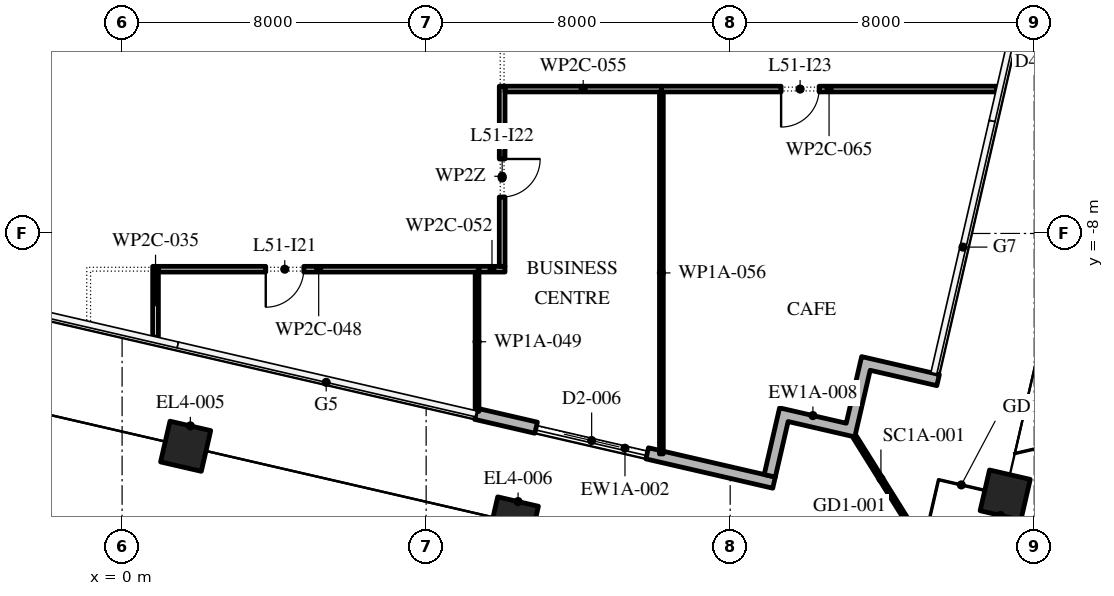
"""IFC4 building model, lengths in metres.
Left out: names, types, materials, properties, quantities, classifications, styles, units other than length and angle.
Written with IfcOpenShell. Run it as: python <this file> out.ifc"""

import sys

from ifc_helpers import new_model, si_unit, direction, frame, frame_2d, origin, origin_2d, place, context, subcontext, project, spatial, polyline, rectangle, outline, extrude, element, fill, save


model = new_model("IFC4")
c1 = context("Model", 3, precision=1e-05, world=origin(), true_north=direction((0.0, 1.0)))
c2 = subcontext(c1, "Body", "Model", "MODEL_VIEW")
j1 = project(units=[si_unit("LENGTHUNIT", "METRE"), si_unit("PLANEANGLEUNIT", "RADIAN")], contexts=[c1])
p1 = place(None, origin())
s1 = spatial("IfcSite", under=j1, at=p1, CompositionType="ELEMENT")
p2 = place(p1, origin())
s2 = spatial("IfcBuilding", under=s1, at=p2, CompositionType="ELEMENT")
p3 = place(p2, frame((0.0, 0.0, 237.0)))
s3 = spatial("IfcBuildingStorey", under=s2, at=p3, CompositionType="ELEMENT", Elevation=237.0)
for number, where, z_axis, x_axis in (
    (1, (1.672, -13.599, 0.0), (0.0, 0.0, 1.0), (0.974, -0.225, 0.0)),
    (2, (10.295, -15.59, 0.0), (0.0, 0.0, 1.0), (0.974, -0.225, 0.0)),
    (3, (23.236, -14.883, 0.0), (0.0, 0.0, 1.0), (0.974, -0.225, 0.0)),
):
    element("IfcColumn", number, at=place(p3, frame(where, z_axis=z_axis, x_axis=x_axis)), inside=s3, PredefinedType="COLUMN", context=c2, shape_type="SweptSolid", body=[
        extrude(rectangle(XDim=1.1, YDim=1.1, at=origin_2d()), origin(), (0.0, 0.0, 1.0), 6.0),
    ])
p4 = place(p3, frame((9.31, -12.745, 0.0), z_axis=(0.0, 0.0, 1.0), x_axis=(0.974372279954, -0.224941459176, 0.0)))
e4 = element("IfcWall", 4, at=p4, inside=s3, PredefinedType="STANDARD", context=c2, shape_type="SweptSolid", body=[
    extrude(rectangle(XDim=8.05, YDim=0.3, at=frame_2d((4.025, 0.0))), origin(), (0.0, 0.0, 1.0), 5.8),
])
p5 = place(p4, frame((1.625, 0.0, 0.0)))
e5 = element("IfcOpeningElement", 5, at=p5, cuts=e4, PredefinedType="OPENING", context=c2, shape_type="SweptSolid", body=[
    extrude(rectangle(XDim=3.0, YDim=3.5, at=frame_2d((1.5, 1.75))), frame((0.0, 0.16, 0.0), z_axis=(0.0, -1.0, 0.0), x_axis=(1.0, 0.0, 0.0)), (0.0, 0.0, 1.0), 0.32),
])
p6 = place(p3, origin())
e6 = element("IfcWall", 6, at=p6, inside=s3, PredefinedType="STANDARD", context=c2, shape_type="SweptSolid", body=[
    extrude(outline(polyline([(19.054, -12.993), (19.459, -11.24), (21.505, -11.712), (21.438, -12.004), (19.684, -11.599), (19.279, -13.353), (17.525, -12.948), (17.188, -14.41), (16.895, -14.342), (17.3, -12.588), (19.054, -12.993)])), origin(), (0.0, 0.0, 1.0), 5.8),
])
p7 = place(p3, frame((19.279, -13.353, 0.0), z_axis=(0.0, 0.0, 1.0), x_axis=(0.529914407191, -0.848051131154, 0.0)))
e7 = element("IfcWall", 7, at=p7, inside=s3, PredefinedType="STANDARD", context=c2, shape_type="SweptSolid", body=[
    extrude(rectangle(XDim=2.596, YDim=0.1, at=frame_2d((1.298, 0.0))), origin(), (0.0, 0.0, 1.0), 5.8),
])
p8 = place(p3, frame((0.88, -8.865, 0.0), z_axis=(0.0, 0.0, 1.0), x_axis=(0.0, -1.0, 0.0)))
e8 = element("IfcWall", 8, at=p8, inside=s3, PredefinedType="PARTITIONING", context=c2, shape_type="SweptSolid", body=[
    extrude(rectangle(XDim=1.863, YDim=0.15, at=frame_2d((0.932, 0.0))), origin(), (0.0, 0.0, 1.0), 5.8),
])
p9 = place(p3, frame((9.39, -8.94, 0.0), z_axis=(0.0, 0.0, 1.0), x_axis=(-1.0, 0.0, 0.0)))
e9 = element("IfcWall", 9, at=p9, inside=s3, PredefinedType="PARTITIONING", context=c2, shape_type="SweptSolid", body=[
    extrude(rectangle(XDim=8.435, YDim=0.15, at=frame_2d((4.217, 0.0))), origin(), (0.0, 0.0, 1.0), 5.8),
])
p10 = place(p9, frame((4.61, 0.0, 0.0)))
e10 = element("IfcOpeningElement", 10, at=p10, cuts=e9, PredefinedType="OPENING", context=c2, shape_type="SweptSolid", body=[
    extrude(rectangle(XDim=1.0, YDim=2.1, at=frame_2d((0.5, 1.05))), frame((0.0, 0.085, 0.0), z_axis=(0.0, -1.0, 0.0), x_axis=(1.0, 0.0, 0.0)), (0.0, 0.0, 1.0), 0.17),
])
p11 = place(p3, frame((9.34, -9.015, 0.0), z_axis=(0.0, 0.0, 1.0), x_axis=(0.0, -1.0, 0.0)))
e11 = element("IfcWall", 11, at=p11, inside=s3, PredefinedType="PARTITIONING", context=c2, shape_type="SweptSolid", body=[
    extrude(rectangle(XDim=3.666, YDim=0.1, at=frame_2d((1.833, 0.0))), origin(), (0.0, 0.0, 1.0), 5.8),
])
p12 = place(p3, frame((10.075, -8.94, 0.0), z_axis=(0.0, 0.0, 1.0), x_axis=(-1.0, 0.0, 0.0)))
e12 = element("IfcWall", 12, at=p12, inside=s3, PredefinedType="PARTITIONING", context=c2, shape_type="SweptSolid", body=[
    extrude(rectangle(XDim=0.685, YDim=0.15, at=frame_2d((0.343, 0.0))), origin(), (0.0, 0.0, 1.0), 5.8),
])
p13 = place(p3, frame((10.0, -4.125, 0.0), z_axis=(0.0, 0.0, 1.0), x_axis=(0.0, -1.0, 0.0)))
e13 = element("IfcWall", 13, at=p13, inside=s3, PredefinedType="PARTITIONING", context=c2, shape_type="SweptSolid", body=[
    extrude(rectangle(XDim=4.74, YDim=0.15, at=frame_2d((2.37, 0.0))), origin(), (0.0, 0.0, 1.0), 5.198),
])
p14 = place(p13, frame((1.915, 0.0, 0.0)))
e14 = element("IfcOpeningElement", 14, at=p14, cuts=e13, PredefinedType="OPENING", context=c2, shape_type="SweptSolid", body=[
    extrude(rectangle(XDim=1.0, YDim=2.1, at=frame_2d((0.5, 1.05))), frame((0.0, 0.085, 0.0), z_axis=(0.0, -1.0, 0.0), x_axis=(1.0, 0.0, 0.0)), (0.0, 0.0, 1.0), 0.17),
])
p15 = place(p3, frame((14.19, -4.2, 0.0), z_axis=(0.0, 0.0, 1.0), x_axis=(-1.0, 0.0, 0.0)))
e15 = element("IfcWall", 15, at=p15, inside=s3, PredefinedType="PARTITIONING", context=c2, shape_type="SweptSolid", body=[
    extrude(rectangle(XDim=4.115, YDim=0.15, at=frame_2d((2.058, 0.0))), origin(), (0.0, 0.0, 1.0), 5.8),
])
p16 = place(p3, frame((14.19, -4.275, 0.0), z_axis=(0.0, 0.0, 1.0), x_axis=(0.0, -1.0, 0.0)))
e16 = element("IfcWall", 16, at=p16, inside=s3, PredefinedType="PARTITIONING", context=c2, shape_type="SweptSolid", body=[
    extrude(rectangle(XDim=9.525, YDim=0.1, at=frame_2d((4.763, 0.0))), origin(), (0.0, 0.0, 1.0), 5.8),
])
p17 = place(p3, frame((23.014, -4.2, 0.0), z_axis=(0.0, 0.0, 1.0), x_axis=(-1.0, 0.0, 0.0)))
e17 = element("IfcWall", 17, at=p17, inside=s3, PredefinedType="PARTITIONING", context=c2, shape_type="SweptSolid", body=[
    extrude(rectangle(XDim=8.824, YDim=0.15, at=frame_2d((4.412, 0.0))), origin(), (0.0, 0.0, 1.0), 5.8),
])
p18 = place(p17, frame((4.674, 0.0, 0.0)))
e18 = element("IfcOpeningElement", 18, at=p18, cuts=e17, PredefinedType="OPENING", context=c2, shape_type="SweptSolid", body=[
    extrude(rectangle(XDim=1.0, YDim=2.1, at=frame_2d((0.5, 1.05))), frame((0.0, 0.085, 0.0), z_axis=(0.0, -1.0, 0.0), x_axis=(1.0, 0.0, 0.0)), (0.0, 0.0, 1.0), 0.17),
])
p19 = place(p5, origin())
e19 = element("IfcDoor", 19, at=p19, inside=s3, OperationType="DOUBLE_DOOR_SLIDING", PredefinedType="DOOR", context=c2, shape_type="SweptSolid", body=[
    extrude(rectangle(XDim=3.0, YDim=3.5, at=frame_2d((1.5, 1.75))), frame((0.0, 0.025, 0.0), z_axis=(0.0, -1.0, 0.0), x_axis=(1.0, 0.0, 0.0)), (0.0, 0.0, 1.0), 0.05),
])
fill(e5, e19)
p20 = place(p10, origin())
e20 = element("IfcDoor", 20, at=p20, inside=s3, OperationType="SINGLE_SWING_LEFT", PredefinedType="DOOR", context=c2, shape_type="SweptSolid", body=[
    extrude(rectangle(XDim=1.0, YDim=2.1, at=frame_2d((0.5, 1.05))), frame((0.0, 0.025, 0.0), z_axis=(0.0, -1.0, 0.0), x_axis=(1.0, 0.0, 0.0)), (0.0, 0.0, 1.0), 0.05),
])
fill(e10, e20)
p21 = place(p14, origin())
e21 = element("IfcDoor", 21, at=p21, inside=s3, OperationType="SINGLE_SWING_RIGHT", PredefinedType="DOOR", context=c2, shape_type="SweptSolid", body=[
    extrude(rectangle(XDim=1.0, YDim=2.1, at=frame_2d((0.5, 1.05))), frame((0.0, 0.025, 0.0), z_axis=(0.0, -1.0, 0.0), x_axis=(1.0, 0.0, 0.0)), (0.0, 0.0, 1.0), 0.05),
])
fill(e14, e21)
p22 = place(p18, origin())
e22 = element("IfcDoor", 22, at=p22, inside=s3, OperationType="SINGLE_SWING_LEFT", PredefinedType="DOOR", context=c2, shape_type="SweptSolid", body=[
    extrude(rectangle(XDim=1.0, YDim=2.1, at=frame_2d((0.5, 1.05))), frame((0.0, 0.025, 0.0), z_axis=(0.0, -1.0, 0.0), x_axis=(1.0, 0.0, 0.0)), (0.0, 0.0, 1.0), 0.05),
])
fill(e18, e22)
save(model, sys.argv[1])
